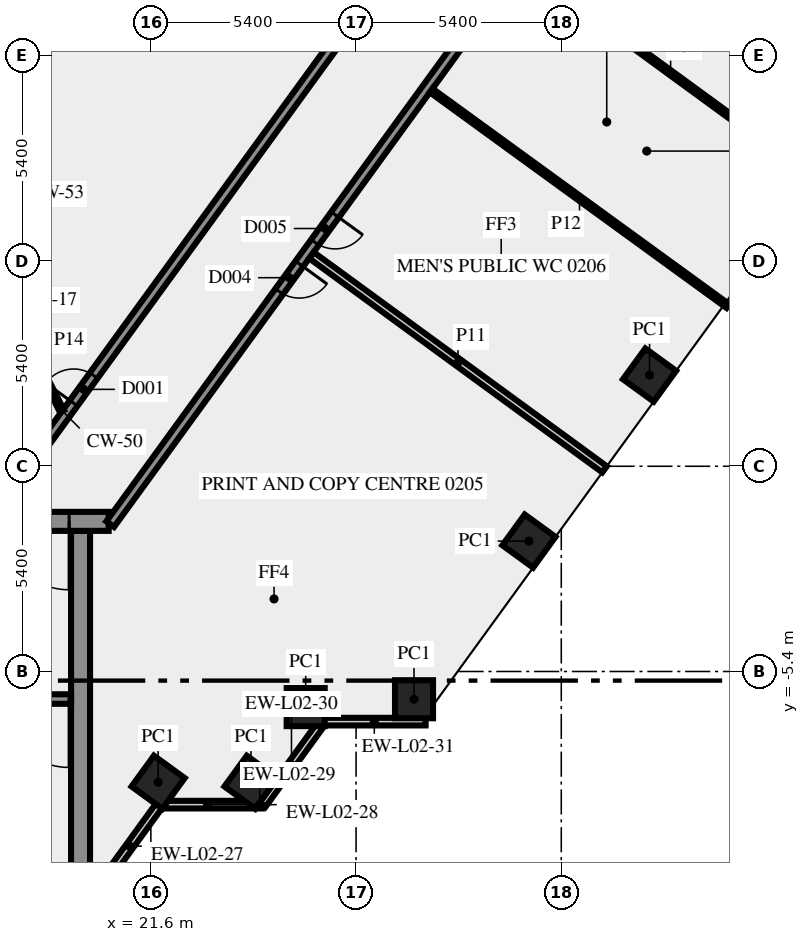
"""IFC4 building model, lengths in metres.
Left out: names, types, materials, properties, quantities, classifications, styles, units other than length and angle.
Written with IfcOpenShell. Run it as: python <this file> out.ifc"""

import sys

from ifc_helpers import new_model, si_unit, direction, frame, frame_2d, origin, origin_2d, place, context, subcontext, project, spatial, rectangle, extrude, element, fill, save


model = new_model("IFC4")
c1 = context("Model", 3, precision=1e-05, world=origin(), true_north=direction((0.0, 1.0)))
c2 = subcontext(c1, "Body", "Model", "MODEL_VIEW")
j1 = project(units=[si_unit("LENGTHUNIT", "METRE"), si_unit("PLANEANGLEUNIT", "RADIAN")], contexts=[c1])
p1 = place(None, origin())
s1 = spatial("IfcSite", under=j1, at=p1, CompositionType="ELEMENT")
p2 = place(p1, origin())
s2 = spatial("IfcBuilding", under=s1, at=p2, CompositionType="ELEMENT")
p3 = place(p2, frame((0.0, 0.0, 11.5)))
s3 = spatial("IfcBuildingStorey", under=s2, at=p3, CompositionType="ELEMENT", Elevation=11.5)
for number, where, z_axis, x_axis in (
    (1, (21.792, -8.315, 0.0), (0.0, 0.0, 1.0), (0.588, 0.809, 0.0)),
    (2, (24.235, -8.315, 0.0), (0.0, 0.0, 1.0), (0.588, 0.809, 0.0)),
    (3, (25.674, -6.337, 0.0), (0.0, 0.0, 1.0), (1.0, 0.0, 0.0)),
    (4, (28.525, -6.13, 0.0), (0.0, 0.0, 1.0), (1.0, 0.0, 0.0)),
    (5, (31.548, -1.969, 0.0), (0.0, 0.0, 1.0), (0.588, 0.809, 0.0)),
    (6, (34.722, 2.4, 0.0), (0.0, 0.0, 1.0), (0.588, 0.809, 0.0)),
):
    element("IfcColumn", number, at=place(p3, frame(where, z_axis=z_axis, x_axis=x_axis)), inside=s3, PredefinedType="COLUMN", context=c2, shape_type="SweptSolid", body=[
        extrude(rectangle(XDim=1.0, YDim=1.0, at=origin_2d()), origin(), (0.0, 0.0, 1.0), 4.1),
    ])
p4 = place(p3, frame((20.253, -11.083, 0.0), z_axis=(0.0, 0.0, 1.0), x_axis=(0.587766567315, 0.809030569476, 0.0)))
e7 = element("IfcWall", 7, at=p4, inside=s3, PredefinedType="SOLIDWALL", context=c2, shape_type="SweptSolid", body=[
    extrude(rectangle(XDim=2.688, YDim=0.2, at=frame_2d((1.344, 0.0))), origin(), (0.0, 0.0, 1.0), 4.1),
])
p5 = place(p3, frame((21.943, -8.904, 0.0), z_axis=(0.0, 0.0, 1.0), x_axis=(1.0, 0.0, 0.0)))
e8 = element("IfcWall", 8, at=p5, inside=s3, PredefinedType="SOLIDWALL", context=c2, shape_type="SweptSolid", body=[
    extrude(rectangle(XDim=2.298, YDim=0.2, at=frame_2d((1.149, 0.0))), origin(), (0.0, 0.0, 1.0), 4.1),
])
p6 = place(p3, frame((24.387, -8.904, 0.0), z_axis=(0.0, 0.0, 1.0), x_axis=(1.0, 0.0, 0.0)))
e9 = element("IfcWall", 9, at=p6, inside=s3, PredefinedType="SOLIDWALL", context=c2, shape_type="SweptSolid", body=[
    extrude(rectangle(XDim=0.156, YDim=0.2, at=frame_2d((0.078, 0.0))), origin(), (0.0, 0.0, 1.0), 4.1),
])
p7 = place(p3, frame((24.54, -8.899, 0.0), z_axis=(0.0, 0.0, 1.0), x_axis=(0.587700286833, 0.809078718578, 0.0)))
e10 = element("IfcWall", 10, at=p7, inside=s3, PredefinedType="SOLIDWALL", context=c2, shape_type="SweptSolid", body=[
    extrude(rectangle(XDim=2.587, YDim=0.2, at=frame_2d((1.293, 0.0))), origin(), (0.0, 0.0, 1.0), 4.1),
])
p8 = place(p3, frame((26.13, -6.719, 0.0), z_axis=(0.0, 0.0, 1.0), x_axis=(1.0, 0.0, 0.0)))
e11 = element("IfcWall", 11, at=p8, inside=s3, PredefinedType="SOLIDWALL", context=c2, shape_type="SweptSolid", body=[
    extrude(rectangle(XDim=2.7, YDim=0.2, at=frame_2d((1.35, 0.0))), origin(), (0.0, 0.0, 1.0), 4.1),
])
p9 = place(p3, frame((19.75, -10.5, 0.0), z_axis=(0.0, 0.0, 1.0), x_axis=(0.0, 1.0, 0.0)))
e12 = element("IfcWall", 12, at=p9, inside=s3, PredefinedType="SHEAR", context=c2, shape_type="SweptSolid", body=[
    extrude(rectangle(XDim=8.8, YDim=0.5, at=frame_2d((4.4, 0.0))), origin(), (0.0, 0.0, 1.0), 4.1),
])
p10 = place(p3, frame((19.5, -6.125, 0.0), z_axis=(0.0, 0.0, 1.0), x_axis=(-1.0, 0.0, 0.0)))
e13 = element("IfcWall", 13, at=p10, inside=s3, PredefinedType="SHEAR", context=c2, shape_type="SweptSolid", body=[
    extrude(rectangle(XDim=8.05, YDim=0.25, at=frame_2d((4.025, 0.0))), origin(), (0.0, 0.0, 1.0), 4.1),
])
p11 = place(p10, frame((0.05, 0.0, 0.0)))
e14 = element("IfcOpeningElement", 14, at=p11, cuts=e13, PredefinedType="OPENING", context=c2, shape_type="SweptSolid", body=[
    extrude(rectangle(XDim=1.8, YDim=2.1, at=frame_2d((0.9, 1.05))), frame((0.0, 0.135, 0.0), z_axis=(0.0, -1.0, 0.0), x_axis=(1.0, 0.0, 0.0)), (0.0, 0.0, 1.0), 0.27),
])
p12 = place(p3, frame((20.49, -1.45, 0.0), z_axis=(0.0, 0.0, 1.0), x_axis=(-1.0, 0.0, 0.0)))
e15 = element("IfcWall", 15, at=p12, inside=s3, PredefinedType="SHEAR", context=c2, shape_type="SweptSolid", body=[
    extrude(rectangle(XDim=40.98, YDim=0.5, at=frame_2d((20.49, 0.0))), origin(), (0.0, 0.0, 1.0), 4.1),
])
p13 = place(p12, frame((38.14, 0.0, 0.0)))
e16 = element("IfcOpeningElement", 16, at=p13, cuts=e15, PredefinedType="OPENING", context=c2, shape_type="SweptSolid", body=[
    extrude(rectangle(XDim=1.8, YDim=2.1, at=frame_2d((0.9, 1.05))), frame((0.0, 0.26, 0.0), z_axis=(0.0, -1.0, 0.0), x_axis=(1.0, 0.0, 0.0)), (0.0, 0.0, 1.0), 0.52),
])
p14 = place(p12, frame((36.728, 0.0, 0.0)))
e17 = element("IfcOpeningElement", 17, at=p14, cuts=e15, PredefinedType="OPENING", context=c2, shape_type="SweptSolid", body=[
    extrude(rectangle(XDim=0.8, YDim=2.1, at=frame_2d((0.4, 1.05))), frame((0.0, 0.26, 0.0), z_axis=(0.0, -1.0, 0.0), x_axis=(1.0, 0.0, 0.0)), (0.0, 0.0, 1.0), 0.52),
])
p15 = place(p12, frame((35.153, 0.0, 0.0)))
e18 = element("IfcOpeningElement", 18, at=p15, cuts=e15, PredefinedType="OPENING", context=c2, shape_type="SweptSolid", body=[
    extrude(rectangle(XDim=0.8, YDim=2.1, at=frame_2d((0.4, 1.05))), frame((0.0, 0.26, 0.0), z_axis=(0.0, -1.0, 0.0), x_axis=(1.0, 0.0, 0.0)), (0.0, 0.0, 1.0), 0.52),
])
p16 = place(p12, frame((32.94, 0.0, 0.0)))
e19 = element("IfcOpeningElement", 19, at=p16, cuts=e15, PredefinedType="OPENING", context=c2, shape_type="SweptSolid", body=[
    extrude(rectangle(XDim=0.9, YDim=2.1, at=frame_2d((0.45, 1.05))), frame((0.0, 0.26, 0.0), z_axis=(0.0, -1.0, 0.0), x_axis=(1.0, 0.0, 0.0)), (0.0, 0.0, 1.0), 0.52),
])
p17 = place(p12, frame((21.765, 0.0, 0.0)))
e20 = element("IfcOpeningElement", 20, at=p17, cuts=e15, PredefinedType="OPENING", context=c2, shape_type="SweptSolid", body=[
    extrude(rectangle(XDim=2.0, YDim=2.1, at=frame_2d((1.0, 1.05))), frame((0.0, 0.26, 0.0), z_axis=(0.0, -1.0, 0.0), x_axis=(1.0, 0.0, 0.0)), (0.0, 0.0, 1.0), 0.52),
])
p18 = place(p12, frame((7.14, 0.0, 0.0)))
e21 = element("IfcOpeningElement", 21, at=p18, cuts=e15, PredefinedType="OPENING", context=c2, shape_type="SweptSolid", body=[
    extrude(rectangle(XDim=0.9, YDim=2.1, at=frame_2d((0.45, 1.05))), frame((0.0, 0.26, 0.0), z_axis=(0.0, -1.0, 0.0), x_axis=(1.0, 0.0, 0.0)), (0.0, 0.0, 1.0), 0.52),
])
p19 = place(p12, frame((4.19, 0.0, 0.0)))
e22 = element("IfcOpeningElement", 22, at=p19, cuts=e15, PredefinedType="OPENING", context=c2, shape_type="SweptSolid", body=[
    extrude(rectangle(XDim=0.9, YDim=2.1, at=frame_2d((0.45, 1.05))), frame((0.0, 0.26, 0.0), z_axis=(0.0, -1.0, 0.0), x_axis=(1.0, 0.0, 0.0)), (0.0, 0.0, 1.0), 0.52),
])
p20 = place(p12, frame((1.04, 0.0, 0.0)))
e23 = element("IfcOpeningElement", 23, at=p20, cuts=e15, PredefinedType="OPENING", context=c2, shape_type="SweptSolid", body=[
    extrude(rectangle(XDim=1.8, YDim=2.1, at=frame_2d((0.9, 1.05))), frame((0.0, 0.26, 0.0), z_axis=(0.0, -1.0, 0.0), x_axis=(1.0, 0.0, 0.0)), (0.0, 0.0, 1.0), 0.52),
])
p21 = place(p3, frame((49.869, 38.856, 0.0), z_axis=(0.0, 0.0, 1.0), x_axis=(-0.587784522481, -0.809017524614, 0.0)))
e24 = element("IfcWall", 24, at=p21, inside=s3, PredefinedType="SOLIDWALL", context=c2, shape_type="SweptSolid", body=[
    extrude(rectangle(XDim=49.912, YDim=0.25, at=frame_2d((24.956, 0.0))), origin(), (0.0, 0.0, 1.0), 4.1),
])
p22 = place(p21, frame((23.897, 0.0, 0.0)))
e25 = element("IfcOpeningElement", 25, at=p22, cuts=e24, PredefinedType="OPENING", context=c2, shape_type="SweptSolid", body=[
    extrude(rectangle(XDim=0.9, YDim=2.1, at=frame_2d((0.45, 1.05))), frame((0.0, 0.135, 0.0), z_axis=(0.0, -1.0, 0.0), x_axis=(1.0, 0.0, 0.0)), (0.0, 0.0, 1.0), 0.27),
])
p23 = place(p21, frame((14.196, 0.0, 0.0)))
e26 = element("IfcOpeningElement", 26, at=p23, cuts=e24, PredefinedType="OPENING", context=c2, shape_type="SweptSolid", body=[
    extrude(rectangle(XDim=0.9, YDim=2.1, at=frame_2d((0.45, 1.05))), frame((0.0, 0.135, 0.0), z_axis=(0.0, -1.0, 0.0), x_axis=(1.0, 0.0, 0.0)), (0.0, 0.0, 1.0), 0.27),
])
p24 = place(p21, frame((39.847, 0.0, 0.0)))
e27 = element("IfcOpeningElement", 27, at=p24, cuts=e24, PredefinedType="OPENING", context=c2, shape_type="SweptSolid", body=[
    extrude(rectangle(XDim=0.9, YDim=2.1, at=frame_2d((0.45, 1.05))), frame((0.0, 0.135, 0.0), z_axis=(0.0, -1.0, 0.0), x_axis=(1.0, 0.0, 0.0)), (0.0, 0.0, 1.0), 0.27),
])
p25 = place(p21, frame((41.446, 0.0, 0.0)))
e28 = element("IfcOpeningElement", 28, at=p25, cuts=e24, PredefinedType="OPENING", context=c2, shape_type="SweptSolid", body=[
    extrude(rectangle(XDim=0.9, YDim=2.1, at=frame_2d((0.45, 1.05))), frame((0.0, 0.135, 0.0), z_axis=(0.0, -1.0, 0.0), x_axis=(1.0, 0.0, 0.0)), (0.0, 0.0, 1.0), 0.27),
])
p26 = place(p21, frame((31.997, 0.0, 0.0)))
e29 = element("IfcOpeningElement", 29, at=p26, cuts=e24, PredefinedType="OPENING", context=c2, shape_type="SweptSolid", body=[
    extrude(rectangle(XDim=0.9, YDim=2.1, at=frame_2d((0.45, 1.05))), frame((0.0, 0.135, 0.0), z_axis=(0.0, -1.0, 0.0), x_axis=(1.0, 0.0, 0.0)), (0.0, 0.0, 1.0), 0.27),
])
p27 = place(p21, frame((22.296, 0.0, 0.0)))
e30 = element("IfcOpeningElement", 30, at=p27, cuts=e24, PredefinedType="OPENING", context=c2, shape_type="SweptSolid", body=[
    extrude(rectangle(XDim=0.9, YDim=2.1, at=frame_2d((0.45, 1.05))), frame((0.0, 0.135, 0.0), z_axis=(0.0, -1.0, 0.0), x_axis=(1.0, 0.0, 0.0)), (0.0, 0.0, 1.0), 0.27),
])
p28 = place(p3, frame((17.545, -1.125, 0.0), z_axis=(0.0, 0.0, 1.0), x_axis=(0.587786323093, 0.809016216391, 0.0)))
e31 = element("IfcWall", 31, at=p28, inside=s3, PredefinedType="SOLIDWALL", context=c2, shape_type="SweptSolid", body=[
    extrude(rectangle(XDim=33.493, YDim=0.25, at=frame_2d((16.747, 0.0))), origin(), (0.0, 0.0, 1.0), 4.1),
])
p29 = place(p28, frame((3.441, 0.0, 0.0)))
e32 = element("IfcOpeningElement", 32, at=p29, cuts=e31, PredefinedType="OPENING", context=c2, shape_type="SweptSolid", body=[
    extrude(rectangle(XDim=0.9, YDim=2.1, at=frame_2d((0.45, 1.05))), frame((0.0, 0.135, 0.0), z_axis=(0.0, -1.0, 0.0), x_axis=(1.0, 0.0, 0.0)), (0.0, 0.0, 1.0), 0.27),
])
p30 = place(p28, frame((26.58, 0.0, 0.0)))
e33 = element("IfcOpeningElement", 33, at=p30, cuts=e31, PredefinedType="OPENING", context=c2, shape_type="SweptSolid", body=[
    extrude(rectangle(XDim=1.8, YDim=2.1, at=frame_2d((0.9, 1.05))), frame((0.0, 0.135, 0.0), z_axis=(0.0, -1.0, 0.0), x_axis=(1.0, 0.0, 0.0)), (0.0, 0.0, 1.0), 0.27),
])
p31 = place(p3, frame((31.38, 13.196, 0.0), z_axis=(0.0, 0.0, 1.0), x_axis=(0.807701085448, -0.589592195137, 0.0)))
e34 = element("IfcWall", 34, at=p31, inside=s3, PredefinedType="PARTITIONING", context=c2, shape_type="SweptSolid", body=[
    extrude(rectangle(XDim=9.651, YDim=0.12, at=frame_2d((4.826, 0.0))), origin(), (0.0, 0.0, 1.0), 3.1),
])
p32 = place(p3, frame((25.826, 5.551, 0.0), z_axis=(0.0, 0.0, 1.0), x_axis=(0.80759810708, -0.589733242612, 0.0)))
e35 = element("IfcWall", 35, at=p32, inside=s3, PredefinedType="SOLIDWALL", context=c2, shape_type="SweptSolid", body=[
    extrude(rectangle(XDim=9.55, YDim=0.2, at=frame_2d((4.775, 0.0))), origin(), (0.0, 0.0, 1.0), 3.1),
])
p33 = place(p3, frame((36.784, 4.215, 0.0), z_axis=(0.0, 0.0, 1.0), x_axis=(-0.808994179369, 0.587816653173, 0.0)))
e36 = element("IfcWall", 36, at=p33, inside=s3, PredefinedType="PARTITIONING", context=c2, shape_type="SweptSolid", body=[
    extrude(rectangle(XDim=9.651, YDim=0.12, at=frame_2d((4.825, 0.0))), origin(), (0.0, 0.0, 1.0), 3.1),
])
p34 = place(p3, frame((18.0, 3.925, 0.0), z_axis=(0.0, 0.0, 1.0), x_axis=(0.453950796792, -0.891026752736, 0.0)))
e37 = element("IfcWall", 37, at=p34, inside=s3, PredefinedType="PARTITIONING", context=c2, shape_type="SweptSolid", body=[
    extrude(rectangle(XDim=2.778, YDim=0.12, at=frame_2d((1.389, 0.0))), origin(), (0.0, 0.0, 1.0), 4.1),
])
p35 = place(p11, origin())
e38 = element("IfcDoor", 38, at=p35, inside=s3, OperationType="DOUBLE_DOOR_SINGLE_SWING", PredefinedType="DOOR", context=c2, shape_type="SweptSolid", body=[
    extrude(rectangle(XDim=1.8, YDim=2.1, at=frame_2d((0.9, 1.05))), frame((0.0, 0.025, 0.0), z_axis=(0.0, -1.0, 0.0), x_axis=(1.0, 0.0, 0.0)), (0.0, 0.0, 1.0), 0.05),
])
fill(e14, e38)
p36 = place(p20, origin())
e39 = element("IfcDoor", 39, at=p36, inside=s3, OperationType="DOUBLE_DOOR_SINGLE_SWING", PredefinedType="DOOR", context=c2, shape_type="SweptSolid", body=[
    extrude(rectangle(XDim=1.8, YDim=2.1, at=frame_2d((0.9, 1.05))), frame((0.0, 0.025, 0.0), z_axis=(0.0, -1.0, 0.0), x_axis=(1.0, 0.0, 0.0)), (0.0, 0.0, 1.0), 0.05),
])
fill(e23, e39)
p37 = place(p29, origin())
e40 = element("IfcDoor", 40, at=p37, inside=s3, OperationType="SINGLE_SWING_LEFT", PredefinedType="DOOR", context=c2, shape_type="SweptSolid", body=[
    extrude(rectangle(XDim=0.9, YDim=2.1, at=frame_2d((0.45, 1.05))), frame((0.0, 0.025, 0.0), z_axis=(0.0, -1.0, 0.0), x_axis=(1.0, 0.0, 0.0)), (0.0, 0.0, 1.0), 0.05),
])
fill(e32, e40)
p38 = place(p24, origin())
e41 = element("IfcDoor", 41, at=p38, inside=s3, OperationType="SINGLE_SWING_RIGHT", PredefinedType="DOOR", context=c2, shape_type="SweptSolid", body=[
    extrude(rectangle(XDim=0.9, YDim=2.1, at=frame_2d((0.45, 1.05))), frame((0.0, 0.025, 0.0), z_axis=(0.0, -1.0, 0.0), x_axis=(1.0, 0.0, 0.0)), (0.0, 0.0, 1.0), 0.05),
])
fill(e27, e41)
p39 = place(p25, origin())
e42 = element("IfcDoor", 42, at=p39, inside=s3, OperationType="SINGLE_SWING_LEFT", PredefinedType="DOOR", context=c2, shape_type="SweptSolid", body=[
    extrude(rectangle(XDim=0.9, YDim=2.1, at=frame_2d((0.45, 1.05))), frame((0.0, 0.025, 0.0), z_axis=(0.0, -1.0, 0.0), x_axis=(1.0, 0.0, 0.0)), (0.0, 0.0, 1.0), 0.05),
])
fill(e28, e42)
save(model, sys.argv[1])
